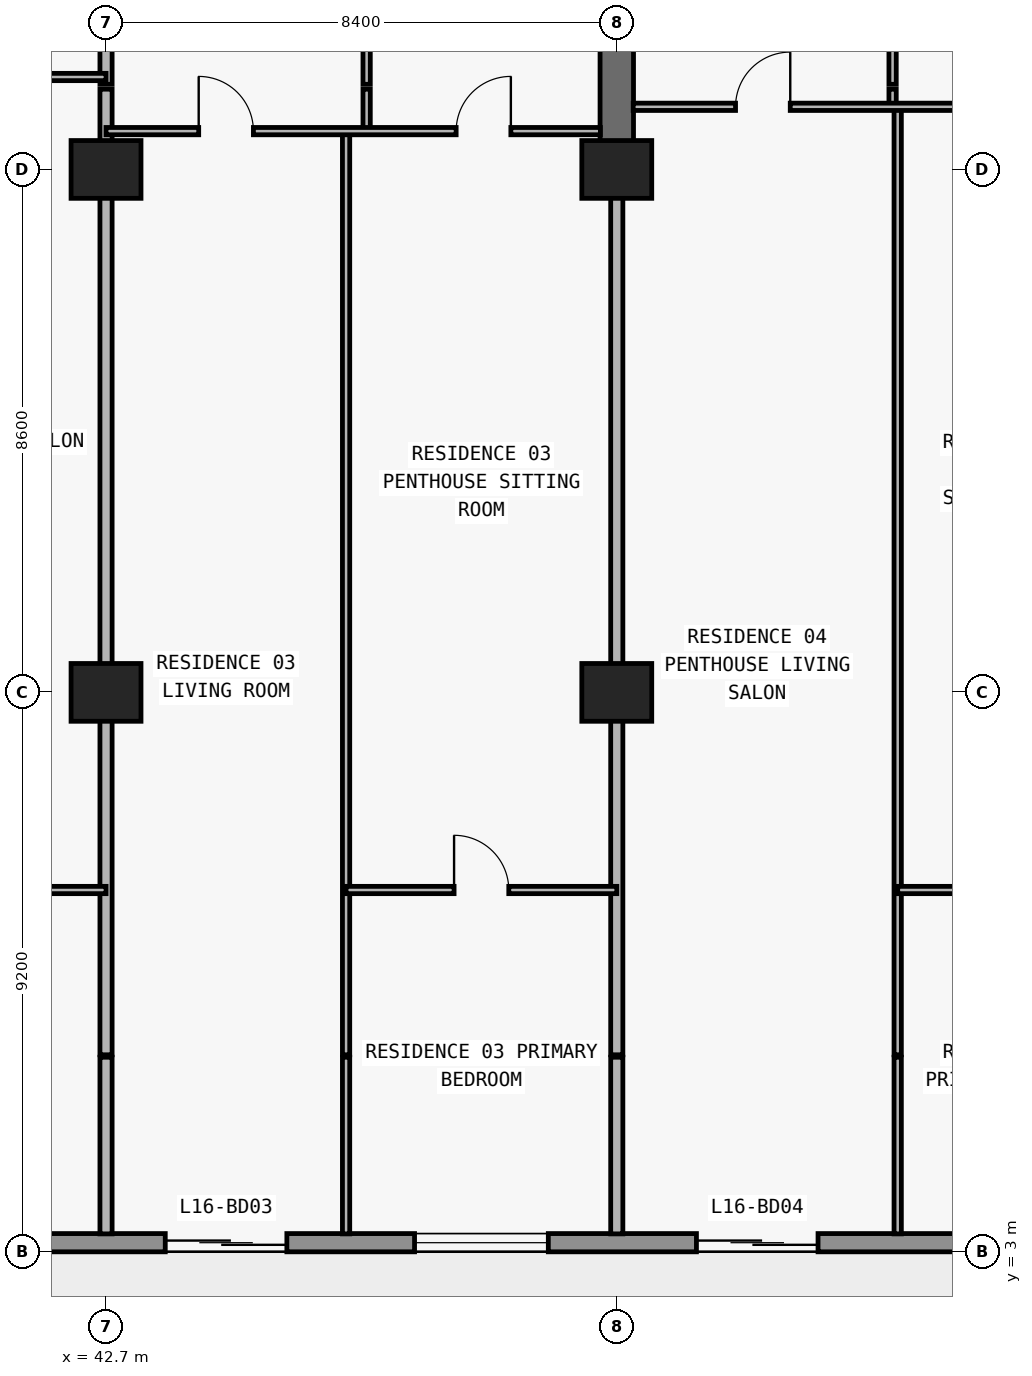
"""IFC4 building model, lengths in metres.
Left out: names, types, materials, properties, quantities, classifications, styles, units other than length and angle.
Written with IfcOpenShell. Run it as: python <this file> out.ifc"""

import sys

from ifc_helpers import new_model, si_unit, direction, frame, frame_2d, origin, origin_2d, place, context, subcontext, project, spatial, rectangle, extrude, element, fill, save


model = new_model("IFC4")
c1 = context("Model", 3, precision=1e-05, world=origin(), true_north=direction((0.0, 1.0)))
c2 = subcontext(c1, "Body", "Model", "MODEL_VIEW")
j1 = project(units=[si_unit("LENGTHUNIT", "METRE"), si_unit("PLANEANGLEUNIT", "RADIAN")], contexts=[c1])
p1 = place(None, origin())
s1 = spatial("IfcSite", under=j1, at=p1, CompositionType="ELEMENT")
p2 = place(p1, origin())
s2 = spatial("IfcBuilding", under=s1, at=p2, CompositionType="ELEMENT")
p3 = place(p2, frame((0.0, 0.0, 63.0)))
s3 = spatial("IfcBuildingStorey", under=s2, at=p3, CompositionType="ELEMENT", Elevation=63.0)
for number, where, z_axis, x_axis in (
    (1, (42.7, 12.2, 0.0), (0.0, 0.0, 1.0), (1.0, 0.0, 0.0)),
    (2, (51.1, 12.2, 0.0), (0.0, 0.0, 1.0), (1.0, 0.0, 0.0)),
    (3, (42.7, 20.8, 0.0), (0.0, 0.0, 1.0), (1.0, 0.0, 0.0)),
    (4, (51.1, 20.8, 0.0), (0.0, 0.0, 1.0), (1.0, 0.0, 0.0)),
):
    element("IfcColumn", number, at=place(p3, frame(where, z_axis=z_axis, x_axis=x_axis)), inside=s3, PredefinedType="COLUMN", context=c2, shape_type="SweptSolid", body=[
        extrude(rectangle(XDim=1.15, YDim=0.95, at=origin_2d()), origin(), (0.0, 0.0, 1.0), 3.05),
    ])
p4 = place(p3, frame((51.1, 20.8, 0.0), z_axis=(0.0, 0.0, 1.0), x_axis=(0.0, 1.0, 0.0)))
e5 = element("IfcWall", 5, at=p4, inside=s3, PredefinedType="SHEAR", context=c2, shape_type="SweptSolid", body=[
    extrude(rectangle(XDim=8.6, YDim=0.55, at=frame_2d((4.3, 0.0))), origin(), (0.0, 0.0, 1.0), 3.05),
])
p5 = place(p3, frame((72.7, 3.15, 0.0), z_axis=(0.0, 0.0, 1.0), x_axis=(-1.0, 0.0, 0.0)))
e6 = element("IfcWall", 6, at=p5, inside=s3, PredefinedType="STANDARD", context=c2, shape_type="SweptSolid", body=[
    extrude(rectangle(XDim=67.6, YDim=0.3, at=frame_2d((33.8, 0.0))), origin(), (0.0, 0.0, 1.0), 3.05),
])
p6 = place(p5, frame((59.89, 0.0, 0.0)))
e7 = element("IfcOpeningElement", 7, at=p6, cuts=e6, PredefinedType="OPENING", context=c2, shape_type="SweptSolid", body=[
    extrude(rectangle(XDim=2.0, YDim=2.3, at=frame_2d((1.0, 1.15))), frame((0.0, 0.16, 0.0), z_axis=(0.0, -1.0, 0.0), x_axis=(1.0, 0.0, 0.0)), (0.0, 0.0, 1.0), 0.32),
])
p7 = place(p5, frame((55.21, 0.0, 0.65)))
e8 = element("IfcOpeningElement", 8, at=p7, cuts=e6, PredefinedType="OPENING", context=c2, shape_type="SweptSolid", body=[
    extrude(rectangle(XDim=2.6, YDim=1.85, at=frame_2d((1.3, 0.925))), frame((0.0, 0.16, 0.0), z_axis=(0.0, -1.0, 0.0), x_axis=(1.0, 0.0, 0.0)), (0.0, 0.0, 1.0), 0.32),
])
p8 = place(p5, frame((49.1, 0.0, 0.85)))
e9 = element("IfcOpeningElement", 9, at=p8, cuts=e6, PredefinedType="OPENING", context=c2, shape_type="SweptSolid", body=[
    extrude(rectangle(XDim=2.2, YDim=1.55, at=frame_2d((1.1, 0.775))), frame((0.0, 0.16, 0.0), z_axis=(0.0, -1.0, 0.0), x_axis=(1.0, 0.0, 0.0)), (0.0, 0.0, 1.0), 0.32),
])
p9 = place(p5, frame((43.09, 0.0, 0.0)))
e10 = element("IfcOpeningElement", 10, at=p9, cuts=e6, PredefinedType="OPENING", context=c2, shape_type="SweptSolid", body=[
    extrude(rectangle(XDim=2.0, YDim=2.3, at=frame_2d((1.0, 1.15))), frame((0.0, 0.16, 0.0), z_axis=(0.0, -1.0, 0.0), x_axis=(1.0, 0.0, 0.0)), (0.0, 0.0, 1.0), 0.32),
])
p10 = place(p5, frame((38.41, 0.0, 0.65)))
e11 = element("IfcOpeningElement", 11, at=p10, cuts=e6, PredefinedType="OPENING", context=c2, shape_type="SweptSolid", body=[
    extrude(rectangle(XDim=2.6, YDim=1.85, at=frame_2d((1.3, 0.925))), frame((0.0, 0.16, 0.0), z_axis=(0.0, -1.0, 0.0), x_axis=(1.0, 0.0, 0.0)), (0.0, 0.0, 1.0), 0.32),
])
p11 = place(p5, frame((32.7, 0.0, 0.85)))
e12 = element("IfcOpeningElement", 12, at=p11, cuts=e6, PredefinedType="OPENING", context=c2, shape_type="SweptSolid", body=[
    extrude(rectangle(XDim=2.2, YDim=1.55, at=frame_2d((1.1, 0.775))), frame((0.0, 0.16, 0.0), z_axis=(0.0, -1.0, 0.0), x_axis=(1.0, 0.0, 0.0)), (0.0, 0.0, 1.0), 0.32),
])
p12 = place(p5, frame((27.026, 0.0, 0.0)))
e13 = element("IfcOpeningElement", 13, at=p12, cuts=e6, PredefinedType="OPENING", context=c2, shape_type="SweptSolid", body=[
    extrude(rectangle(XDim=2.0, YDim=2.3, at=frame_2d((1.0, 1.15))), frame((0.0, 0.16, 0.0), z_axis=(0.0, -1.0, 0.0), x_axis=(1.0, 0.0, 0.0)), (0.0, 0.0, 1.0), 0.32),
])
p13 = place(p5, frame((22.726, 0.0, 0.85)))
e14 = element("IfcOpeningElement", 14, at=p13, cuts=e6, PredefinedType="OPENING", context=c2, shape_type="SweptSolid", body=[
    extrude(rectangle(XDim=2.2, YDim=1.55, at=frame_2d((1.1, 0.775))), frame((0.0, 0.16, 0.0), z_axis=(0.0, -1.0, 0.0), x_axis=(1.0, 0.0, 0.0)), (0.0, 0.0, 1.0), 0.32),
])
p14 = place(p5, frame((18.29, 0.0, 0.0)))
e15 = element("IfcOpeningElement", 15, at=p14, cuts=e6, PredefinedType="OPENING", context=c2, shape_type="SweptSolid", body=[
    extrude(rectangle(XDim=2.0, YDim=2.3, at=frame_2d((1.0, 1.15))), frame((0.0, 0.16, 0.0), z_axis=(0.0, -1.0, 0.0), x_axis=(1.0, 0.0, 0.0)), (0.0, 0.0, 1.0), 0.32),
])
p15 = place(p5, frame((14.19, 0.0, 0.85)))
e16 = element("IfcOpeningElement", 16, at=p15, cuts=e6, PredefinedType="OPENING", context=c2, shape_type="SweptSolid", body=[
    extrude(rectangle(XDim=1.8, YDim=1.55, at=frame_2d((0.9, 0.775))), frame((0.0, 0.16, 0.0), z_axis=(0.0, -1.0, 0.0), x_axis=(1.0, 0.0, 0.0)), (0.0, 0.0, 1.0), 0.32),
])
p16 = place(p5, frame((10.226, 0.0, 0.0)))
e17 = element("IfcOpeningElement", 17, at=p16, cuts=e6, PredefinedType="OPENING", context=c2, shape_type="SweptSolid", body=[
    extrude(rectangle(XDim=2.0, YDim=2.3, at=frame_2d((1.0, 1.15))), frame((0.0, 0.16, 0.0), z_axis=(0.0, -1.0, 0.0), x_axis=(1.0, 0.0, 0.0)), (0.0, 0.0, 1.0), 0.32),
])
p17 = place(p5, frame((5.926, 0.0, 0.85)))
e18 = element("IfcOpeningElement", 18, at=p17, cuts=e6, PredefinedType="OPENING", context=c2, shape_type="SweptSolid", body=[
    extrude(rectangle(XDim=2.2, YDim=1.55, at=frame_2d((1.1, 0.775))), frame((0.0, 0.16, 0.0), z_axis=(0.0, -1.0, 0.0), x_axis=(1.0, 0.0, 0.0)), (0.0, 0.0, 1.0), 0.32),
])
p18 = place(p3, frame((42.7, 3.295, 0.0), z_axis=(0.0, 0.0, 1.0), x_axis=(0.0, 1.0, 0.0)))
e19 = element("IfcWall", 19, at=p18, inside=s3, PredefinedType="PARTITIONING", context=c2, shape_type="SweptSolid", body=[
    extrude(rectangle(XDim=2.905, YDim=0.2, at=frame_2d((1.453, 0.0))), origin(), (0.0, 0.0, 1.0), 3.05),
])
p19 = place(p3, frame((42.7, 6.24, 0.0), z_axis=(0.0, 0.0, 1.0), x_axis=(0.0, 1.0, 0.0)))
e20 = element("IfcWall", 20, at=p19, inside=s3, PredefinedType="PARTITIONING", context=c2, shape_type="SweptSolid", body=[
    extrude(rectangle(XDim=15.88, YDim=0.2, at=frame_2d((7.94, 0.0))), origin(), (0.0, 0.0, 1.0), 2.11),
])
p20 = place(p3, frame((42.7, 22.2, 0.0), z_axis=(0.0, 0.0, 1.0), x_axis=(0.0, 1.0, 0.0)))
e21 = element("IfcWall", 21, at=p20, inside=s3, PredefinedType="PARTITIONING", context=c2, shape_type="SweptSolid", body=[
    extrude(rectangle(XDim=4.38, YDim=0.2, at=frame_2d((2.19, 0.0))), origin(), (0.0, 0.0, 1.0), 2.11),
])
p21 = place(p3, frame((46.648, 3.295, 0.0), z_axis=(0.0, 0.0, 1.0), x_axis=(0.0, 1.0, 0.0)))
e22 = element("IfcWall", 22, at=p21, inside=s3, PredefinedType="PARTITIONING", context=c2, shape_type="SweptSolid", body=[
    extrude(rectangle(XDim=2.905, YDim=0.12, at=frame_2d((1.453, 0.0))), origin(), (0.0, 0.0, 1.0), 3.05),
])
p22 = place(p3, frame((46.648, 6.24, 0.0), z_axis=(0.0, 0.0, 1.0), x_axis=(0.0, 1.0, 0.0)))
e23 = element("IfcWall", 23, at=p22, inside=s3, PredefinedType="PARTITIONING", context=c2, shape_type="SweptSolid", body=[
    extrude(rectangle(XDim=15.19, YDim=0.12, at=frame_2d((7.595, 0.0))), origin(), (0.0, 0.0, 1.0), 3.05),
])
p23 = place(p3, frame((46.986, 21.43, 0.0), z_axis=(0.0, 0.0, 1.0), x_axis=(0.0, 1.0, 0.0)))
e24 = element("IfcWall", 24, at=p23, inside=s3, PredefinedType="PARTITIONING", context=c2, shape_type="SweptSolid", body=[
    extrude(rectangle(XDim=0.69, YDim=0.12, at=frame_2d((0.345, 0.0))), origin(), (0.0, 0.0, 1.0), 3.05),
])
p24 = place(p3, frame((46.986, 22.2, 0.0), z_axis=(0.0, 0.0, 1.0), x_axis=(0.0, 1.0, 0.0)))
e25 = element("IfcWall", 25, at=p24, inside=s3, PredefinedType="PARTITIONING", context=c2, shape_type="SweptSolid", body=[
    extrude(rectangle(XDim=4.38, YDim=0.12, at=frame_2d((2.19, 0.0))), origin(), (0.0, 0.0, 1.0), 3.05),
])
p25 = place(p24, frame((1.74, 0.0, 0.0)))
e26 = element("IfcOpeningElement", 26, at=p25, cuts=e25, PredefinedType="OPENING", context=c2, shape_type="SweptSolid", body=[
    extrude(rectangle(XDim=0.9, YDim=2.15, at=frame_2d((0.45, 1.075))), frame((0.0, 0.07, 0.0), z_axis=(0.0, -1.0, 0.0), x_axis=(1.0, 0.0, 0.0)), (0.0, 0.0, 1.0), 0.14),
])
p26 = place(p3, frame((51.1, 3.295, 0.0), z_axis=(0.0, 0.0, 1.0), x_axis=(0.0, 1.0, 0.0)))
e27 = element("IfcWall", 27, at=p26, inside=s3, PredefinedType="PARTITIONING", context=c2, shape_type="SweptSolid", body=[
    extrude(rectangle(XDim=2.905, YDim=0.2, at=frame_2d((1.453, 0.0))), origin(), (0.0, 0.0, 1.0), 3.05),
])
p27 = place(p3, frame((51.1, 6.24, 0.0), z_axis=(0.0, 0.0, 1.0), x_axis=(0.0, 1.0, 0.0)))
e28 = element("IfcWall", 28, at=p27, inside=s3, PredefinedType="PARTITIONING", context=c2, shape_type="SweptSolid", body=[
    extrude(rectangle(XDim=14.555, YDim=0.2, at=frame_2d((7.277, 0.0))), origin(), (0.0, 0.0, 1.0), 2.11),
])
p28 = place(p3, frame((55.636, 21.83, 0.0), z_axis=(0.0, 0.0, 1.0), x_axis=(0.0, 1.0, 0.0)))
e29 = element("IfcWall", 29, at=p28, inside=s3, PredefinedType="PARTITIONING", context=c2, shape_type="SweptSolid", body=[
    extrude(rectangle(XDim=0.29, YDim=0.12, at=frame_2d((0.145, 0.0))), origin(), (0.0, 0.0, 1.0), 3.05),
])
p29 = place(p3, frame((55.636, 22.2, 0.0), z_axis=(0.0, 0.0, 1.0), x_axis=(0.0, 1.0, 0.0)))
e30 = element("IfcWall", 30, at=p29, inside=s3, PredefinedType="PARTITIONING", context=c2, shape_type="SweptSolid", body=[
    extrude(rectangle(XDim=4.38, YDim=0.12, at=frame_2d((2.19, 0.0))), origin(), (0.0, 0.0, 1.0), 3.05),
])
p30 = place(p29, frame((1.74, 0.0, 0.0)))
e31 = element("IfcOpeningElement", 31, at=p30, cuts=e30, PredefinedType="OPENING", context=c2, shape_type="SweptSolid", body=[
    extrude(rectangle(XDim=0.9, YDim=2.15, at=frame_2d((0.45, 1.075))), frame((0.0, 0.07, 0.0), z_axis=(0.0, -1.0, 0.0), x_axis=(1.0, 0.0, 0.0)), (0.0, 0.0, 1.0), 0.14),
])
p31 = place(p3, frame((55.72, 3.295, 0.0), z_axis=(0.0, 0.0, 1.0), x_axis=(0.0, 1.0, 0.0)))
e32 = element("IfcWall", 32, at=p31, inside=s3, PredefinedType="PARTITIONING", context=c2, shape_type="SweptSolid", body=[
    extrude(rectangle(XDim=2.905, YDim=0.12, at=frame_2d((1.453, 0.0))), origin(), (0.0, 0.0, 1.0), 3.05),
])
p32 = place(p3, frame((55.72, 6.24, 0.0), z_axis=(0.0, 0.0, 1.0), x_axis=(0.0, 1.0, 0.0)))
e33 = element("IfcWall", 33, at=p32, inside=s3, PredefinedType="PARTITIONING", context=c2, shape_type="SweptSolid", body=[
    extrude(rectangle(XDim=15.585, YDim=0.12, at=frame_2d((7.792, 0.0))), origin(), (0.0, 0.0, 1.0), 3.05),
])
p33 = place(p3, frame((35.1, 8.95, 0.0), z_axis=(0.0, 0.0, 1.0), x_axis=(1.0, 0.0, 0.0)))
e34 = element("IfcWall", 34, at=p33, inside=s3, PredefinedType="PARTITIONING", context=c2, shape_type="SweptSolid", body=[
    extrude(rectangle(XDim=7.6, YDim=0.12, at=frame_2d((3.8, 0.0))), origin(), (0.0, 0.0, 1.0), 3.05),
])
p34 = place(p33, frame((3.35, 0.0, 0.0)))
e35 = element("IfcOpeningElement", 35, at=p34, cuts=e34, PredefinedType="OPENING", context=c2, shape_type="SweptSolid", body=[
    extrude(rectangle(XDim=0.9, YDim=2.15, at=frame_2d((0.45, 1.075))), frame((0.0, 0.07, 0.0), z_axis=(0.0, -1.0, 0.0), x_axis=(1.0, 0.0, 0.0)), (0.0, 0.0, 1.0), 0.14),
])
p35 = place(p3, frame((46.648, 8.95, 0.0), z_axis=(0.0, 0.0, 1.0), x_axis=(1.0, 0.0, 0.0)))
e36 = element("IfcWall", 36, at=p35, inside=s3, PredefinedType="PARTITIONING", context=c2, shape_type="SweptSolid", body=[
    extrude(rectangle(XDim=4.452, YDim=0.12, at=frame_2d((2.226, 0.0))), origin(), (0.0, 0.0, 1.0), 3.05),
])
p36 = place(p35, frame((1.776, 0.0, 0.0)))
e37 = element("IfcOpeningElement", 37, at=p36, cuts=e36, PredefinedType="OPENING", context=c2, shape_type="SweptSolid", body=[
    extrude(rectangle(XDim=0.9, YDim=2.15, at=frame_2d((0.45, 1.075))), frame((0.0, 0.07, 0.0), z_axis=(0.0, -1.0, 0.0), x_axis=(1.0, 0.0, 0.0)), (0.0, 0.0, 1.0), 0.14),
])
p37 = place(p3, frame((55.72, 8.95, 0.0), z_axis=(0.0, 0.0, 1.0), x_axis=(1.0, 0.0, 0.0)))
e38 = element("IfcWall", 38, at=p37, inside=s3, PredefinedType="PARTITIONING", context=c2, shape_type="SweptSolid", body=[
    extrude(rectangle(XDim=3.78, YDim=0.12, at=frame_2d((1.89, 0.0))), origin(), (0.0, 0.0, 1.0), 3.05),
])
p38 = place(p37, frame((1.44, 0.0, 0.0)))
e39 = element("IfcOpeningElement", 39, at=p38, cuts=e38, PredefinedType="OPENING", context=c2, shape_type="SweptSolid", body=[
    extrude(rectangle(XDim=0.9, YDim=2.15, at=frame_2d((0.45, 1.075))), frame((0.0, 0.07, 0.0), z_axis=(0.0, -1.0, 0.0), x_axis=(1.0, 0.0, 0.0)), (0.0, 0.0, 1.0), 0.14),
])
p39 = place(p3, frame((42.7, 21.43, 0.0), z_axis=(0.0, 0.0, 1.0), x_axis=(1.0, 0.0, 0.0)))
e40 = element("IfcWall", 40, at=p39, inside=s3, PredefinedType="PARTITIONING", context=c2, shape_type="SweptSolid", body=[
    extrude(rectangle(XDim=8.13, YDim=0.12, at=frame_2d((4.065, 0.0))), origin(), (0.0, 0.0, 1.0), 3.05),
])
p40 = place(p39, frame((1.524, 0.0, 0.0)))
e41 = element("IfcOpeningElement", 41, at=p40, cuts=e40, PredefinedType="OPENING", context=c2, shape_type="SweptSolid", body=[
    extrude(rectangle(XDim=0.9, YDim=2.15, at=frame_2d((0.45, 1.075))), frame((0.0, 0.07, 0.0), z_axis=(0.0, -1.0, 0.0), x_axis=(1.0, 0.0, 0.0)), (0.0, 0.0, 1.0), 0.14),
])
p41 = place(p39, frame((5.758, 0.0, 0.0)))
e42 = element("IfcOpeningElement", 42, at=p41, cuts=e40, PredefinedType="OPENING", context=c2, shape_type="SweptSolid", body=[
    extrude(rectangle(XDim=0.9, YDim=2.15, at=frame_2d((0.45, 1.075))), frame((0.0, 0.07, 0.0), z_axis=(0.0, -1.0, 0.0), x_axis=(1.0, 0.0, 0.0)), (0.0, 0.0, 1.0), 0.14),
])
p42 = place(p3, frame((51.37, 21.83, 0.0), z_axis=(0.0, 0.0, 1.0), x_axis=(1.0, 0.0, 0.0)))
e43 = element("IfcWall", 43, at=p42, inside=s3, PredefinedType="PARTITIONING", context=c2, shape_type="SweptSolid", body=[
    extrude(rectangle(XDim=8.13, YDim=0.12, at=frame_2d((4.065, 0.0))), origin(), (0.0, 0.0, 1.0), 3.05),
])
p43 = place(p42, frame((1.683, 0.0, 0.0)))
e44 = element("IfcOpeningElement", 44, at=p43, cuts=e43, PredefinedType="OPENING", context=c2, shape_type="SweptSolid", body=[
    extrude(rectangle(XDim=0.9, YDim=2.15, at=frame_2d((0.45, 1.075))), frame((0.0, 0.07, 0.0), z_axis=(0.0, -1.0, 0.0), x_axis=(1.0, 0.0, 0.0)), (0.0, 0.0, 1.0), 0.14),
])
p44 = place(p42, frame((5.79, 0.0, 0.0)))
e45 = element("IfcOpeningElement", 45, at=p44, cuts=e43, PredefinedType="OPENING", context=c2, shape_type="SweptSolid", body=[
    extrude(rectangle(XDim=0.9, YDim=2.15, at=frame_2d((0.45, 1.075))), frame((0.0, 0.07, 0.0), z_axis=(0.0, -1.0, 0.0), x_axis=(1.0, 0.0, 0.0)), (0.0, 0.0, 1.0), 0.14),
])
p45 = place(p3, frame((35.105, 22.32, 0.0), z_axis=(0.0, 0.0, 1.0), x_axis=(1.0, 0.0, 0.0)))
e46 = element("IfcWall", 46, at=p45, inside=s3, PredefinedType="PARTITIONING", context=c2, shape_type="SweptSolid", body=[
    extrude(rectangle(XDim=7.595, YDim=0.12, at=frame_2d((3.797, 0.0))), origin(), (0.0, 0.0, 1.0), 3.05),
])
p46 = place(p45, frame((3.347, 0.0, 0.0)))
e47 = element("IfcOpeningElement", 47, at=p46, cuts=e46, PredefinedType="OPENING", context=c2, shape_type="SweptSolid", body=[
    extrude(rectangle(XDim=0.9, YDim=2.15, at=frame_2d((0.45, 1.075))), frame((0.0, 0.07, 0.0), z_axis=(0.0, -1.0, 0.0), x_axis=(1.0, 0.0, 0.0)), (0.0, 0.0, 1.0), 0.14),
])
p47 = place(p12, origin())
e48 = element("IfcDoor", 48, at=p47, inside=s3, OperationType="DOUBLE_DOOR_SLIDING", PredefinedType="DOOR", context=c2, shape_type="SweptSolid", body=[
    extrude(rectangle(XDim=2.0, YDim=2.3, at=frame_2d((1.0, 1.15))), frame((0.0, 0.025, 0.0), z_axis=(0.0, -1.0, 0.0), x_axis=(1.0, 0.0, 0.0)), (0.0, 0.0, 1.0), 0.05),
])
fill(e13, e48)
p48 = place(p13, origin())
e49 = element("IfcWindow", 49, at=p48, inside=s3, PartitioningType="SINGLE_PANEL", PredefinedType="WINDOW", context=c2, shape_type="SweptSolid", body=[
    extrude(rectangle(XDim=2.2, YDim=1.55, at=frame_2d((1.1, 0.775))), frame((0.0, 0.03, 0.0), z_axis=(0.0, -1.0, 0.0), x_axis=(1.0, 0.0, 0.0)), (0.0, 0.0, 1.0), 0.06),
])
fill(e14, e49)
p49 = place(p14, origin())
e50 = element("IfcDoor", 50, at=p49, inside=s3, OperationType="DOUBLE_DOOR_SLIDING", PredefinedType="DOOR", context=c2, shape_type="SweptSolid", body=[
    extrude(rectangle(XDim=2.0, YDim=2.3, at=frame_2d((1.0, 1.15))), frame((0.0, 0.025, 0.0), z_axis=(0.0, -1.0, 0.0), x_axis=(1.0, 0.0, 0.0)), (0.0, 0.0, 1.0), 0.05),
])
fill(e15, e50)
p50 = place(p40, origin())
e51 = element("IfcDoor", 51, at=p50, inside=s3, OperationType="SINGLE_SWING_LEFT", PredefinedType="DOOR", context=c2, shape_type="SweptSolid", body=[
    extrude(rectangle(XDim=0.9, YDim=2.15, at=frame_2d((0.45, 1.075))), frame((0.0, 0.025, 0.0), z_axis=(0.0, -1.0, 0.0), x_axis=(1.0, 0.0, 0.0)), (0.0, 0.0, 1.0), 0.05),
])
fill(e41, e51)
p51 = place(p41, origin())
e52 = element("IfcDoor", 52, at=p51, inside=s3, OperationType="SINGLE_SWING_RIGHT", PredefinedType="DOOR", context=c2, shape_type="SweptSolid", body=[
    extrude(rectangle(XDim=0.9, YDim=2.15, at=frame_2d((0.45, 1.075))), frame((0.0, 0.025, 0.0), z_axis=(0.0, -1.0, 0.0), x_axis=(1.0, 0.0, 0.0)), (0.0, 0.0, 1.0), 0.05),
])
fill(e42, e52)
p52 = place(p36, origin())
e53 = element("IfcDoor", 53, at=p52, inside=s3, OperationType="SINGLE_SWING_LEFT", PredefinedType="DOOR", context=c2, shape_type="SweptSolid", body=[
    extrude(rectangle(XDim=0.9, YDim=2.15, at=frame_2d((0.45, 1.075))), frame((0.0, 0.025, 0.0), z_axis=(0.0, -1.0, 0.0), x_axis=(1.0, 0.0, 0.0)), (0.0, 0.0, 1.0), 0.05),
])
fill(e37, e53)
p53 = place(p43, origin())
e54 = element("IfcDoor", 54, at=p53, inside=s3, OperationType="SINGLE_SWING_RIGHT", PredefinedType="DOOR", context=c2, shape_type="SweptSolid", body=[
    extrude(rectangle(XDim=0.9, YDim=2.15, at=frame_2d((0.45, 1.075))), frame((0.0, 0.025, 0.0), z_axis=(0.0, -1.0, 0.0), x_axis=(1.0, 0.0, 0.0)), (0.0, 0.0, 1.0), 0.05),
])
fill(e44, e54)
save(model, sys.argv[1])
